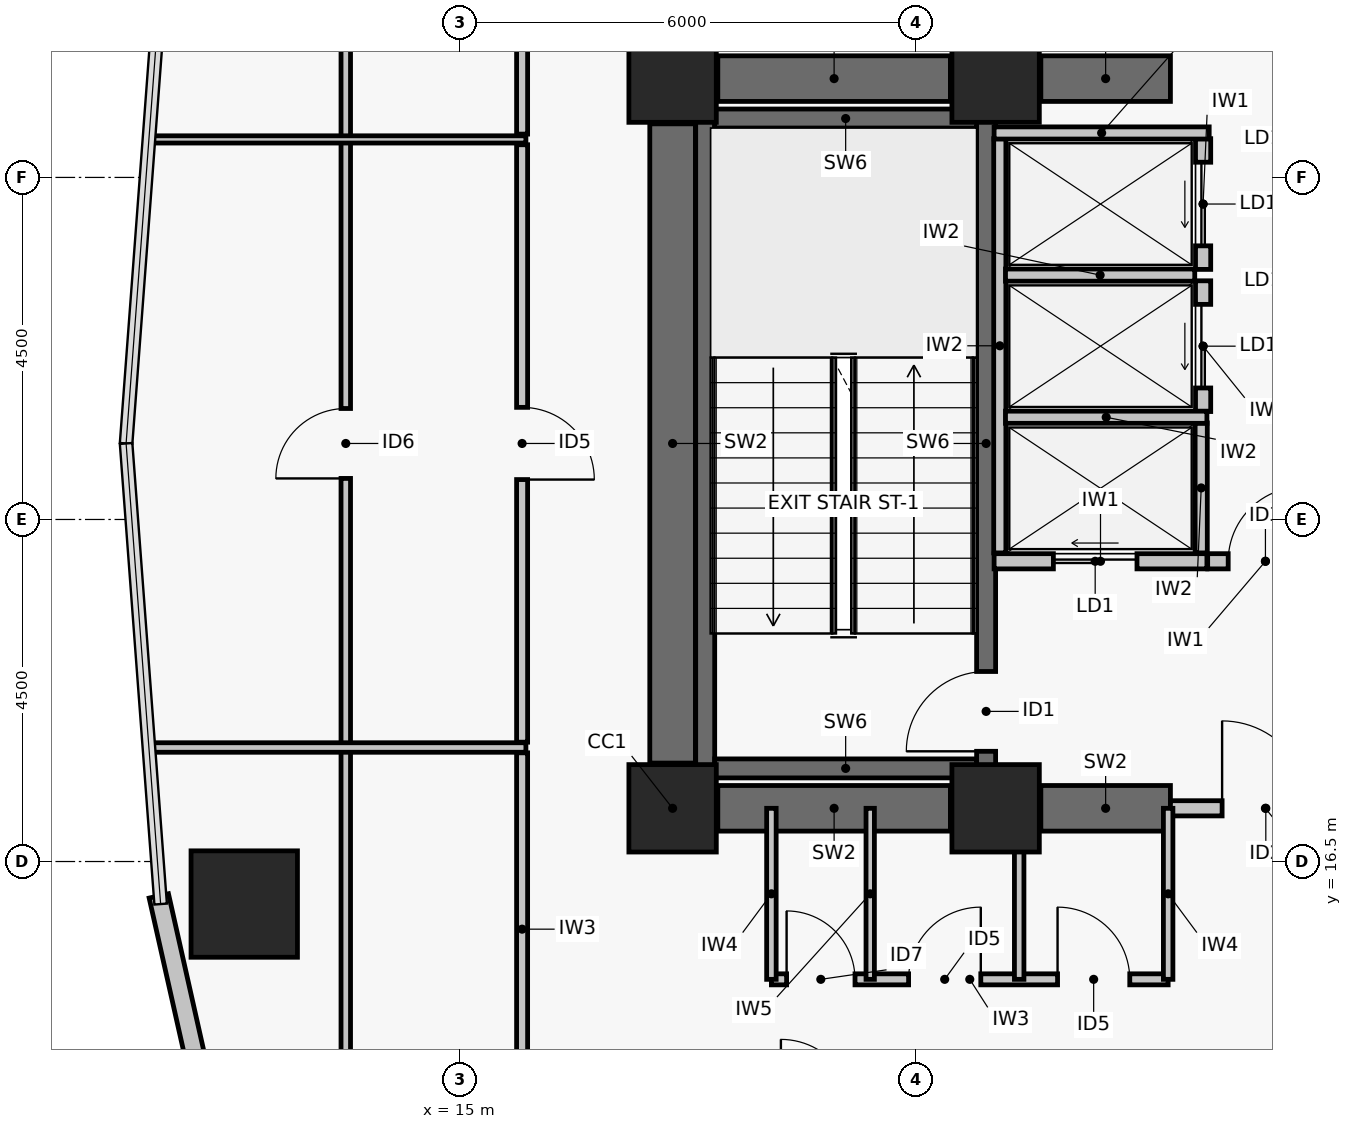
"""IFC4 building model, lengths in metres.
Left out: names, types, materials, properties, quantities, classifications, styles, units other than length and angle.
Written with IfcOpenShell. Run it as: python <this file> out.ifc"""

import sys

from ifc_helpers import new_model, si_unit, direction, frame, frame_2d, origin, origin_2d, place, context, subcontext, project, spatial, rectangle, hollow_rectangle, extrude, element, fill, save


model = new_model("IFC4")
c1 = context("Model", 3, precision=1e-05, world=origin(), true_north=direction((0.0, 1.0)))
c2 = subcontext(c1, "Body", "Model", "MODEL_VIEW")
j1 = project(units=[si_unit("LENGTHUNIT", "METRE"), si_unit("PLANEANGLEUNIT", "RADIAN")], contexts=[c1])
p1 = place(None, origin())
s1 = spatial("IfcSite", under=j1, at=p1, CompositionType="ELEMENT")
p2 = place(p1, origin())
s2 = spatial("IfcBuilding", under=s1, at=p2, CompositionType="ELEMENT")
p3 = place(p2, frame((0.0, 0.0, 68.52)))
s3 = spatial("IfcBuildingStorey", under=s2, at=p3, CompositionType="ELEMENT", Elevation=68.52)
for number, where, z_axis, x_axis in (
    (1, (17.8, 17.2, 0.0), (0.0, 0.0, 1.0), (1.0, 0.0, 0.0)),
    (2, (22.05, 17.2, 0.0), (0.0, 0.0, 1.0), (1.0, 0.0, 0.0)),
    (3, (17.8, 26.8, 0.0), (0.0, 0.0, 1.0), (1.0, 0.0, 0.0)),
    (4, (22.05, 26.8, 0.0), (0.0, 0.0, 1.0), (1.0, 0.0, 0.0)),
):
    element("IfcColumn", number, at=place(p3, frame(where, z_axis=z_axis, x_axis=x_axis)), inside=s3, PredefinedType="COLUMN", context=c2, shape_type="SweptSolid", body=[
        extrude(rectangle(XDim=1.15, YDim=1.15, at=origin_2d()), origin(), (0.0, 0.0, 1.0), 3.72),
    ])
p4 = place(p3, frame((18.395, 17.2, 0.0), z_axis=(0.0, 0.0, 1.0), x_axis=(1.0, 0.0, 0.0)))
e5 = element("IfcWall", 5, at=p4, inside=s3, PredefinedType="SHEAR", context=c2, shape_type="SweptSolid", body=[
    extrude(rectangle(XDim=3.06, YDim=0.6, at=frame_2d((1.53, 0.0))), origin(), (0.0, 0.0, 1.0), 3.47),
])
p5 = place(p3, frame((22.645, 17.2, 0.0), z_axis=(0.0, 0.0, 1.0), x_axis=(1.0, 0.0, 0.0)))
e6 = element("IfcWall", 6, at=p5, inside=s3, PredefinedType="SHEAR", context=c2, shape_type="SweptSolid", body=[
    extrude(rectangle(XDim=1.705, YDim=0.6, at=frame_2d((0.853, 0.0))), origin(), (0.0, 0.0, 1.0), 3.47),
])
p6 = place(p3, frame((18.395, 26.8, 0.0), z_axis=(0.0, 0.0, 1.0), x_axis=(1.0, 0.0, 0.0)))
e7 = element("IfcWall", 7, at=p6, inside=s3, PredefinedType="SHEAR", context=c2, shape_type="SweptSolid", body=[
    extrude(rectangle(XDim=3.06, YDim=0.6, at=frame_2d((1.53, 0.0))), origin(), (0.0, 0.0, 1.0), 3.47),
])
p7 = place(p3, frame((22.645, 26.8, 0.0), z_axis=(0.0, 0.0, 1.0), x_axis=(1.0, 0.0, 0.0)))
e8 = element("IfcWall", 8, at=p7, inside=s3, PredefinedType="SHEAR", context=c2, shape_type="SweptSolid", body=[
    extrude(rectangle(XDim=1.705, YDim=0.6, at=frame_2d((0.853, 0.0))), origin(), (0.0, 0.0, 1.0), 3.47),
])
p8 = place(p3, frame((17.8, 17.795, 0.0), z_axis=(0.0, 0.0, 1.0), x_axis=(0.0, 1.0, 0.0)))
e9 = element("IfcWall", 9, at=p8, inside=s3, PredefinedType="SHEAR", context=c2, shape_type="SweptSolid", body=[
    extrude(rectangle(XDim=8.41, YDim=0.6, at=frame_2d((4.205, 0.0))), origin(), (0.0, 0.0, 1.0), 3.47),
])
p9 = place(p3, frame((18.229, 17.6, 0.0), z_axis=(0.0, 0.0, 1.0), x_axis=(0.0, 1.0, 0.0)))
e10 = element("IfcWall", 10, at=p9, inside=s3, PredefinedType="SHEAR", context=c2, shape_type="SweptSolid", body=[
    extrude(rectangle(XDim=8.8, YDim=0.25, at=frame_2d((4.4, 0.0))), origin(), (0.0, 0.0, 1.0), 3.47),
])
p10 = place(p3, frame((21.925, 17.6, 0.0), z_axis=(0.0, 0.0, 1.0), x_axis=(0.0, 1.0, 0.0)))
e11 = element("IfcWall", 11, at=p10, inside=s3, PredefinedType="SHEAR", context=c2, shape_type="SweptSolid", body=[
    extrude(rectangle(XDim=8.8, YDim=0.25, at=frame_2d((4.4, 0.0))), origin(), (0.0, 0.0, 1.0), 3.47),
])
p11 = place(p10, frame((0.35, 0.0, 0.0)))
e12 = element("IfcOpeningElement", 12, at=p11, cuts=e11, PredefinedType="OPENING", context=c2, shape_type="SweptSolid", body=[
    extrude(rectangle(XDim=1.05, YDim=2.08, at=frame_2d((0.525, 1.04))), frame((0.0, 0.135, 0.0), z_axis=(0.0, -1.0, 0.0), x_axis=(1.0, 0.0, 0.0)), (0.0, 0.0, 1.0), 0.27),
])
for number, where, z_axis, x_axis in (
    (13, (18.354, 17.725, 0.0), (0.0, 0.0, 1.0), (1.0, 0.0, 0.0)),
    (14, (18.354, 26.275, 0.0), (0.0, 0.0, 1.0), (1.0, 0.0, 0.0)),
):
    element("IfcWall", number, at=place(p3, frame(where, z_axis=z_axis, x_axis=x_axis)), inside=s3, PredefinedType="SHEAR", context=c2, shape_type="SweptSolid", body=[
        extrude(rectangle(XDim=3.446, YDim=0.25, at=frame_2d((1.723, 0.0))), origin(), (0.0, 0.0, 1.0), 3.47),
    ])
p12 = place(p3, frame((12.164, 15.94, 0.0), z_axis=(0.0, 0.0, 1.0), x_axis=(1.0, 0.0, 0.0)))
e15 = element("IfcColumn", 15, at=p12, inside=s3, PredefinedType="COLUMN", context=c2, shape_type="SweptSolid", body=[
    extrude(hollow_rectangle(XDim=1.4, YDim=1.4, WallThickness=0.055, at=origin_2d()), origin(), (0.0, 0.0, 1.0), 3.72),
])
p13 = place(p3, frame((12.427, 9.881, 0.0), z_axis=(0.0, 0.0, 1.0), x_axis=(-0.219502085231, 0.975612030768, 0.0)))
e16 = element("IfcWall", 16, at=p13, inside=s3, PredefinedType="PARTITIONING", context=c2, shape_type="SweptSolid", body=[
    extrude(rectangle(XDim=6.321, YDim=0.26, at=frame_2d((3.16, 0.0))), origin(), (0.0, 0.0, 1.0), 3.47),
])
p14 = place(p3, frame((24.35, 17.2, 0.0), z_axis=(0.0, 0.0, 1.0), x_axis=(1.0, 0.0, 0.0)))
e17 = element("IfcWall", 17, at=p14, inside=s3, PredefinedType="PARTITIONING", context=c2, shape_type="SweptSolid", body=[
    extrude(rectangle(XDim=2.5, YDim=0.2, at=frame_2d((1.25, 0.0))), origin(), (0.0, 0.0, 1.0), 2.6),
])
p15 = place(p14, frame((0.68, 0.0, 0.0)))
e18 = element("IfcOpeningElement", 18, at=p15, cuts=e17, PredefinedType="OPENING", context=c2, shape_type="SweptSolid", body=[
    extrude(rectangle(XDim=1.15, YDim=2.08, at=frame_2d((0.575, 1.04))), frame((0.0, 0.11, 0.0), z_axis=(0.0, -1.0, 0.0), x_axis=(1.0, 0.0, 0.0)), (0.0, 0.0, 1.0), 0.22),
])
p16 = place(p3, frame((24.84, 20.45, 0.0), z_axis=(0.0, 0.0, 1.0), x_axis=(1.0, 0.0, 0.0)))
e19 = element("IfcWall", 19, at=p16, inside=s3, PredefinedType="PARTITIONING", context=c2, shape_type="SweptSolid", body=[
    extrude(rectangle(XDim=1.52, YDim=0.2, at=frame_2d((0.76, 0.0))), origin(), (0.0, 0.0, 1.0), 3.47),
])
p17 = place(p16, frame((0.27, 0.0, 0.0)))
e20 = element("IfcOpeningElement", 20, at=p17, cuts=e19, PredefinedType="OPENING", context=c2, shape_type="SweptSolid", body=[
    extrude(rectangle(XDim=0.98, YDim=2.06, at=frame_2d((0.49, 1.03))), frame((0.0, 0.11, 0.0), z_axis=(0.0, -1.0, 0.0), x_axis=(1.0, 0.0, 0.0)), (0.0, 0.0, 1.0), 0.22),
])
p18 = place(p3, frame((22.03, 20.45, 0.0), z_axis=(0.0, 0.0, 1.0), x_axis=(1.0, 0.0, 0.0)))
e21 = element("IfcWall", 21, at=p18, inside=s3, PredefinedType="PARTITIONING", context=c2, shape_type="SweptSolid", body=[
    extrude(rectangle(XDim=2.8, YDim=0.2, at=frame_2d((1.4, 0.0))), origin(), (0.0, 0.0, 1.0), 3.47),
])
p19 = place(p18, frame((0.78, 0.0, 0.0)))
e22 = element("IfcOpeningElement", 22, at=p19, cuts=e21, PredefinedType="OPENING", context=c2, shape_type="SweptSolid", body=[
    extrude(rectangle(XDim=1.1, YDim=2.08, at=frame_2d((0.55, 1.04))), frame((0.0, 0.11, 0.0), z_axis=(0.0, -1.0, 0.0), x_axis=(1.0, 0.0, 0.0)), (0.0, 0.0, 1.0), 0.22),
])
p20 = place(p3, frame((24.78, 22.42, 0.0), z_axis=(0.0, 0.0, 1.0), x_axis=(0.0, 1.0, 0.0)))
e23 = element("IfcWall", 23, at=p20, inside=s3, PredefinedType="PARTITIONING", context=c2, shape_type="SweptSolid", body=[
    extrude(rectangle(XDim=1.72, YDim=0.2, at=frame_2d((0.86, 0.0))), origin(), (0.0, 0.0, 1.0), 3.47),
])
p21 = place(p20, frame((0.31, 0.0, 0.0)))
e24 = element("IfcOpeningElement", 24, at=p21, cuts=e23, PredefinedType="OPENING", context=c2, shape_type="SweptSolid", body=[
    extrude(rectangle(XDim=1.1, YDim=2.08, at=frame_2d((0.55, 1.04))), frame((0.0, 0.11, 0.0), z_axis=(0.0, -1.0, 0.0), x_axis=(1.0, 0.0, 0.0)), (0.0, 0.0, 1.0), 0.22),
])
p22 = place(p3, frame((24.78, 24.29, 0.0), z_axis=(0.0, 0.0, 1.0), x_axis=(0.0, 1.0, 0.0)))
e25 = element("IfcWall", 25, at=p22, inside=s3, PredefinedType="PARTITIONING", context=c2, shape_type="SweptSolid", body=[
    extrude(rectangle(XDim=1.72, YDim=0.2, at=frame_2d((0.86, 0.0))), origin(), (0.0, 0.0, 1.0), 3.47),
])
p23 = place(p22, frame((0.31, 0.0, 0.0)))
e26 = element("IfcOpeningElement", 26, at=p23, cuts=e25, PredefinedType="OPENING", context=c2, shape_type="SweptSolid", body=[
    extrude(rectangle(XDim=1.1, YDim=2.08, at=frame_2d((0.55, 1.04))), frame((0.0, 0.11, 0.0), z_axis=(0.0, -1.0, 0.0), x_axis=(1.0, 0.0, 0.0)), (0.0, 0.0, 1.0), 0.22),
])
p24 = place(p3, frame((22.105, 20.56, 0.0), z_axis=(0.0, 0.0, 1.0), x_axis=(0.0, 1.0, 0.0)))
e27 = element("IfcWall", 27, at=p24, inside=s3, PredefinedType="PARTITIONING", context=c2, shape_type="SweptSolid", body=[
    extrude(rectangle(XDim=5.45, YDim=0.16, at=frame_2d((2.725, 0.0))), origin(), (0.0, 0.0, 1.0), 3.47),
])
p25 = place(p3, frame((24.755, 20.56, 0.0), z_axis=(0.0, 0.0, 1.0), x_axis=(0.0, 1.0, 0.0)))
e28 = element("IfcWall", 28, at=p25, inside=s3, PredefinedType="PARTITIONING", context=c2, shape_type="SweptSolid", body=[
    extrude(rectangle(XDim=1.71, YDim=0.16, at=frame_2d((0.855, 0.0))), origin(), (0.0, 0.0, 1.0), 3.47),
])
p26 = place(p3, frame((22.18, 22.345, 0.0), z_axis=(0.0, 0.0, 1.0), x_axis=(1.0, 0.0, 0.0)))
e29 = element("IfcWall", 29, at=p26, inside=s3, PredefinedType="PARTITIONING", context=c2, shape_type="SweptSolid", body=[
    extrude(rectangle(XDim=2.65, YDim=0.16, at=frame_2d((1.325, 0.0))), origin(), (0.0, 0.0, 1.0), 3.47),
])
p27 = place(p3, frame((22.18, 24.215, 0.0), z_axis=(0.0, 0.0, 1.0), x_axis=(1.0, 0.0, 0.0)))
e30 = element("IfcWall", 30, at=p27, inside=s3, PredefinedType="PARTITIONING", context=c2, shape_type="SweptSolid", body=[
    extrude(rectangle(XDim=2.49, YDim=0.16, at=frame_2d((1.245, 0.0))), origin(), (0.0, 0.0, 1.0), 3.47),
])
p28 = place(p3, frame((22.03, 26.085, 0.0), z_axis=(0.0, 0.0, 1.0), x_axis=(1.0, 0.0, 0.0)))
e31 = element("IfcWall", 31, at=p28, inside=s3, PredefinedType="PARTITIONING", context=c2, shape_type="SweptSolid", body=[
    extrude(rectangle(XDim=2.83, YDim=0.16, at=frame_2d((1.415, 0.0))), origin(), (0.0, 0.0, 1.0), 3.47),
])
p29 = place(p3, frame((19.1, 14.95, 0.0), z_axis=(0.0, 0.0, 1.0), x_axis=(1.0, 0.0, 0.0)))
e32 = element("IfcWall", 32, at=p29, inside=s3, PredefinedType="PARTITIONING", context=c2, shape_type="SweptSolid", body=[
    extrude(rectangle(XDim=5.22, YDim=0.145, at=frame_2d((2.61, 0.0))), origin(), (0.0, 0.0, 1.0), 2.2),
])
p30 = place(p29, frame((0.2, 0.0, 0.0)))
e33 = element("IfcOpeningElement", 33, at=p30, cuts=e32, PredefinedType="OPENING", context=c2, shape_type="SweptSolid", body=[
    extrude(rectangle(XDim=0.9, YDim=2.02, at=frame_2d((0.45, 1.01))), frame((0.0, 0.083, 0.0), z_axis=(0.0, -1.0, 0.0), x_axis=(1.0, 0.0, 0.0)), (0.0, 0.0, 1.0), 0.165),
])
p31 = place(p29, frame((1.805, 0.0, 0.0)))
e34 = element("IfcOpeningElement", 34, at=p31, cuts=e32, PredefinedType="OPENING", context=c2, shape_type="SweptSolid", body=[
    extrude(rectangle(XDim=0.95, YDim=2.06, at=frame_2d((0.475, 1.03))), frame((0.0, 0.083, 0.0), z_axis=(0.0, -1.0, 0.0), x_axis=(1.0, 0.0, 0.0)), (0.0, 0.0, 1.0), 0.165),
])
p32 = place(p29, frame((3.765, 0.0, 0.0)))
e35 = element("IfcOpeningElement", 35, at=p32, cuts=e32, PredefinedType="OPENING", context=c2, shape_type="SweptSolid", body=[
    extrude(rectangle(XDim=0.95, YDim=2.06, at=frame_2d((0.475, 1.03))), frame((0.0, 0.083, 0.0), z_axis=(0.0, -1.0, 0.0), x_axis=(1.0, 0.0, 0.0)), (0.0, 0.0, 1.0), 0.165),
])
p33 = place(p3, frame((19.1, 14.95, 0.0), z_axis=(0.0, 0.0, 1.0), x_axis=(0.0, 1.0, 0.0)))
e36 = element("IfcWall", 36, at=p33, inside=s3, PredefinedType="PARTITIONING", context=c2, shape_type="SweptSolid", body=[
    extrude(rectangle(XDim=2.25, YDim=0.125, at=frame_2d((1.125, 0.0))), origin(), (0.0, 0.0, 1.0), 2.6),
])
p34 = place(p3, frame((20.4, 14.95, 0.0), z_axis=(0.0, 0.0, 1.0), x_axis=(0.0, 1.0, 0.0)))
e37 = element("IfcWall", 37, at=p34, inside=s3, PredefinedType="PARTITIONING", context=c2, shape_type="SweptSolid", body=[
    extrude(rectangle(XDim=2.25, YDim=0.11, at=frame_2d((1.125, 0.0))), origin(), (0.0, 0.0, 1.0), 2.6),
])
p35 = place(p3, frame((22.36, 14.95, 0.0), z_axis=(0.0, 0.0, 1.0), x_axis=(0.0, 1.0, 0.0)))
e38 = element("IfcWall", 38, at=p35, inside=s3, PredefinedType="PARTITIONING", context=c2, shape_type="SweptSolid", body=[
    extrude(rectangle(XDim=2.25, YDim=0.125, at=frame_2d((1.125, 0.0))), origin(), (0.0, 0.0, 1.0), 2.2),
])
p36 = place(p3, frame((24.32, 14.95, 0.0), z_axis=(0.0, 0.0, 1.0), x_axis=(0.0, 1.0, 0.0)))
e39 = element("IfcWall", 39, at=p36, inside=s3, PredefinedType="PARTITIONING", context=c2, shape_type="SweptSolid", body=[
    extrude(rectangle(XDim=2.25, YDim=0.125, at=frame_2d((1.125, 0.0))), origin(), (0.0, 0.0, 1.0), 2.6),
])
p37 = place(p3, frame((15.82, 17.93, 0.0), z_axis=(0.0, 0.0, 1.0), x_axis=(0.0, -1.0, 0.0)))
e40 = element("IfcWall", 40, at=p37, inside=s3, PredefinedType="PARTITIONING", context=c2, shape_type="SweptSolid", body=[
    extrude(rectangle(XDim=4.64, YDim=0.145, at=frame_2d((2.32, 0.0))), origin(), (0.0, 0.0, 1.0), 2.2),
])
p38 = place(p3, frame((15.82, 28.7, 0.0), z_axis=(0.0, 0.0, 1.0), x_axis=(0.0, -1.0, 0.0)))
e41 = element("IfcWall", 41, at=p38, inside=s3, PredefinedType="PARTITIONING", context=c2, shape_type="SweptSolid", body=[
    extrude(rectangle(XDim=2.63, YDim=0.145, at=frame_2d((1.315, 0.0))), origin(), (0.0, 0.0, 1.0), 2.2),
])
p39 = place(p3, frame((15.82, 25.93, 0.0), z_axis=(0.0, 0.0, 1.0), x_axis=(0.0, -1.0, 0.0)))
e42 = element("IfcWall", 42, at=p39, inside=s3, PredefinedType="PARTITIONING", context=c2, shape_type="SweptSolid", body=[
    extrude(rectangle(XDim=7.86, YDim=0.145, at=frame_2d((3.93, 0.0))), origin(), (0.0, 0.0, 1.0), 3.47),
])
p40 = place(p39, frame((3.455, 0.0, 0.0)))
e43 = element("IfcOpeningElement", 43, at=p40, cuts=e42, PredefinedType="OPENING", context=c2, shape_type="SweptSolid", body=[
    extrude(rectangle(XDim=0.95, YDim=2.06, at=frame_2d((0.475, 1.03))), frame((0.0, 0.083, 0.0), z_axis=(0.0, -1.0, 0.0), x_axis=(1.0, 0.0, 0.0)), (0.0, 0.0, 1.0), 0.165),
])
p41 = place(p3, frame((13.5, 7.123, 0.0), z_axis=(0.0, 0.0, 1.0), x_axis=(0.0, 1.0, 0.0)))
e44 = element("IfcWall", 44, at=p41, inside=s3, PredefinedType="PARTITIONING", context=c2, shape_type="SweptSolid", body=[
    extrude(rectangle(XDim=29.754, YDim=0.125, at=frame_2d((14.877, 0.0))), origin(), (0.0, 0.0, 1.0), 2.2),
])
p42 = place(p41, frame((3.888, 0.0, 0.0)))
e45 = element("IfcOpeningElement", 45, at=p42, cuts=e44, PredefinedType="OPENING", context=c2, shape_type="SweptSolid", body=[
    extrude(rectangle(XDim=0.92, YDim=2.05, at=frame_2d((0.46, 1.025))), frame((0.0, 0.073, 0.0), z_axis=(0.0, -1.0, 0.0), x_axis=(1.0, 0.0, 0.0)), (0.0, 0.0, 1.0), 0.145),
])
p43 = place(p41, frame((24.946, 0.0, 0.0)))
e46 = element("IfcOpeningElement", 46, at=p43, cuts=e44, PredefinedType="OPENING", context=c2, shape_type="SweptSolid", body=[
    extrude(rectangle(XDim=0.92, YDim=2.05, at=frame_2d((0.46, 1.025))), frame((0.0, 0.073, 0.0), z_axis=(0.0, -1.0, 0.0), x_axis=(1.0, 0.0, 0.0)), (0.0, 0.0, 1.0), 0.145),
])
p44 = place(p41, frame((14.417, 0.0, 0.0)))
e47 = element("IfcOpeningElement", 47, at=p44, cuts=e44, PredefinedType="OPENING", context=c2, shape_type="SweptSolid", body=[
    extrude(rectangle(XDim=0.92, YDim=2.05, at=frame_2d((0.46, 1.025))), frame((0.0, 0.073, 0.0), z_axis=(0.0, -1.0, 0.0), x_axis=(1.0, 0.0, 0.0)), (0.0, 0.0, 1.0), 0.145),
])
p45 = place(p3, frame((10.9, 18.0, 0.0), z_axis=(0.0, 0.0, 1.0), x_axis=(1.0, 0.0, 0.0)))
e48 = element("IfcWall", 48, at=p45, inside=s3, PredefinedType="PARTITIONING", context=c2, shape_type="SweptSolid", body=[
    extrude(rectangle(XDim=4.97, YDim=0.125, at=frame_2d((2.485, 0.0))), origin(), (0.0, 0.0, 1.0), 2.85),
])
p46 = place(p3, frame((10.9, 26.0, 0.0), z_axis=(0.0, 0.0, 1.0), x_axis=(1.0, 0.0, 0.0)))
e49 = element("IfcWall", 49, at=p46, inside=s3, PredefinedType="PARTITIONING", context=c2, shape_type="SweptSolid", body=[
    extrude(rectangle(XDim=4.97, YDim=0.095, at=frame_2d((2.485, 0.0))), origin(), (0.0, 0.0, 1.0), 2.85),
])
p47 = place(p11, origin())
e50 = element("IfcDoor", 50, at=p47, inside=s3, OperationType="SINGLE_SWING_LEFT", PredefinedType="DOOR", context=c2, shape_type="SweptSolid", body=[
    extrude(rectangle(XDim=1.05, YDim=2.08, at=frame_2d((0.525, 1.04))), frame((0.0, 0.025, 0.0), z_axis=(0.0, -1.0, 0.0), x_axis=(1.0, 0.0, 0.0)), (0.0, 0.0, 1.0), 0.05),
])
fill(e12, e50)
p48 = place(p15, origin())
e51 = element("IfcDoor", 51, at=p48, inside=s3, OperationType="SINGLE_SWING_LEFT", PredefinedType="DOOR", context=c2, shape_type="SweptSolid", body=[
    extrude(rectangle(XDim=1.15, YDim=2.08, at=frame_2d((0.575, 1.04))), frame((0.0, 0.025, 0.0), z_axis=(0.0, -1.0, 0.0), x_axis=(1.0, 0.0, 0.0)), (0.0, 0.0, 1.0), 0.05),
])
fill(e18, e51)
p49 = place(p17, origin())
e52 = element("IfcDoor", 52, at=p49, inside=s3, OperationType="SINGLE_SWING_RIGHT", PredefinedType="DOOR", context=c2, shape_type="SweptSolid", body=[
    extrude(rectangle(XDim=0.98, YDim=2.06, at=frame_2d((0.49, 1.03))), frame((0.0, 0.025, 0.0), z_axis=(0.0, -1.0, 0.0), x_axis=(1.0, 0.0, 0.0)), (0.0, 0.0, 1.0), 0.05),
])
fill(e20, e52)
p50 = place(p19, origin())
e53 = element("IfcDoor", 53, at=p50, inside=s3, OperationType="DOUBLE_DOOR_SLIDING", PredefinedType="DOOR", context=c2, shape_type="SweptSolid", body=[
    extrude(rectangle(XDim=1.1, YDim=2.08, at=frame_2d((0.55, 1.04))), frame((0.0, 0.025, 0.0), z_axis=(0.0, -1.0, 0.0), x_axis=(1.0, 0.0, 0.0)), (0.0, 0.0, 1.0), 0.05),
])
fill(e22, e53)
p51 = place(p21, origin())
e54 = element("IfcDoor", 54, at=p51, inside=s3, OperationType="DOUBLE_DOOR_SLIDING", PredefinedType="DOOR", context=c2, shape_type="SweptSolid", body=[
    extrude(rectangle(XDim=1.1, YDim=2.08, at=frame_2d((0.55, 1.04))), frame((0.0, 0.025, 0.0), z_axis=(0.0, -1.0, 0.0), x_axis=(1.0, 0.0, 0.0)), (0.0, 0.0, 1.0), 0.05),
])
fill(e24, e54)
p52 = place(p23, origin())
e55 = element("IfcDoor", 55, at=p52, inside=s3, OperationType="DOUBLE_DOOR_SLIDING", PredefinedType="DOOR", context=c2, shape_type="SweptSolid", body=[
    extrude(rectangle(XDim=1.1, YDim=2.08, at=frame_2d((0.55, 1.04))), frame((0.0, 0.025, 0.0), z_axis=(0.0, -1.0, 0.0), x_axis=(1.0, 0.0, 0.0)), (0.0, 0.0, 1.0), 0.05),
])
fill(e26, e55)
p53 = place(p30, origin())
e56 = element("IfcDoor", 56, at=p53, inside=s3, OperationType="SINGLE_SWING_LEFT", PredefinedType="DOOR", context=c2, shape_type="SweptSolid", body=[
    extrude(rectangle(XDim=0.9, YDim=2.02, at=frame_2d((0.45, 1.01))), frame((0.0, 0.025, 0.0), z_axis=(0.0, -1.0, 0.0), x_axis=(1.0, 0.0, 0.0)), (0.0, 0.0, 1.0), 0.05),
])
fill(e33, e56)
p54 = place(p31, origin())
e57 = element("IfcDoor", 57, at=p54, inside=s3, OperationType="SINGLE_SWING_RIGHT", PredefinedType="DOOR", context=c2, shape_type="SweptSolid", body=[
    extrude(rectangle(XDim=0.95, YDim=2.06, at=frame_2d((0.475, 1.03))), frame((0.0, 0.025, 0.0), z_axis=(0.0, -1.0, 0.0), x_axis=(1.0, 0.0, 0.0)), (0.0, 0.0, 1.0), 0.05),
])
fill(e34, e57)
p55 = place(p32, origin())
e58 = element("IfcDoor", 58, at=p55, inside=s3, OperationType="SINGLE_SWING_LEFT", PredefinedType="DOOR", context=c2, shape_type="SweptSolid", body=[
    extrude(rectangle(XDim=0.95, YDim=2.06, at=frame_2d((0.475, 1.03))), frame((0.0, 0.025, 0.0), z_axis=(0.0, -1.0, 0.0), x_axis=(1.0, 0.0, 0.0)), (0.0, 0.0, 1.0), 0.05),
])
fill(e35, e58)
p56 = place(p40, origin())
e59 = element("IfcDoor", 59, at=p56, inside=s3, OperationType="SINGLE_SWING_RIGHT", PredefinedType="DOOR", context=c2, shape_type="SweptSolid", body=[
    extrude(rectangle(XDim=0.95, YDim=2.06, at=frame_2d((0.475, 1.03))), frame((0.0, 0.025, 0.0), z_axis=(0.0, -1.0, 0.0), x_axis=(1.0, 0.0, 0.0)), (0.0, 0.0, 1.0), 0.05),
])
fill(e43, e59)
p57 = place(p44, origin())
e60 = element("IfcDoor", 60, at=p57, inside=s3, OperationType="SINGLE_SWING_LEFT", PredefinedType="DOOR", context=c2, shape_type="SweptSolid", body=[
    extrude(rectangle(XDim=0.92, YDim=2.05, at=frame_2d((0.46, 1.025))), frame((0.0, 0.025, 0.0), z_axis=(0.0, -1.0, 0.0), x_axis=(1.0, 0.0, 0.0)), (0.0, 0.0, 1.0), 0.05),
])
fill(e47, e60)
save(model, sys.argv[1])
